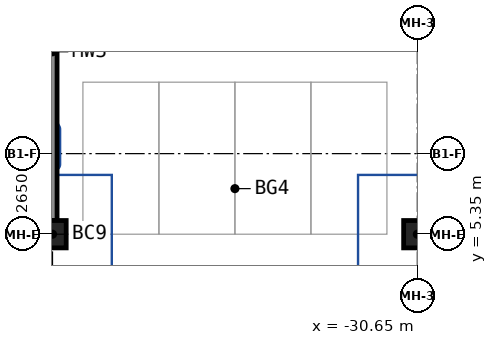
"""IFC4 building model, lengths in metres.
Left out: names, types, materials, properties, quantities, classifications, styles, units other than length and angle.
Written with IfcOpenShell. Run it as: python <this file> out.ifc"""

import sys

from ifc_helpers import new_model, si_unit, direction, frame, frame_2d, origin, origin_2d, place, context, subcontext, project, spatial, rectangle, extrude, source, transform, mapped, element, save


model = new_model("IFC4")
c1 = context("Model", 3, precision=1e-05, world=origin(), true_north=direction((0.0, 1.0)))
c2 = subcontext(c1, "Body", "Model", "MODEL_VIEW")
j1 = project(units=[si_unit("LENGTHUNIT", "METRE"), si_unit("PLANEANGLEUNIT", "RADIAN")], contexts=[c1])
p1 = place(None, origin())
s1 = spatial("IfcSite", under=j1, at=p1, CompositionType="ELEMENT")
p2 = place(p1, origin())
s2 = spatial("IfcBuilding", under=s1, at=p2, CompositionType="ELEMENT")
p3 = place(p2, frame((0.0, 0.0, -9.0)))
s3 = spatial("IfcBuildingStorey", under=s2, at=p3, CompositionType="ELEMENT", Elevation=-9.0)
m1 = source(origin(), c2, "Body", "SweptSolid", [
    extrude(rectangle(XDim=11.1, YDim=0.3, at=frame_2d((5.55, 0.0))), origin(), (0.0, 0.0, 1.0), 4.1),
])
p4 = place(p3, frame((-42.65, 5.8, 0.0), z_axis=(0.0, 0.0, 1.0), x_axis=(0.0, 1.0, 0.0)))
e1 = element("IfcWall", 1, at=p4, inside=s3, PredefinedType="SHEAR", context=c2, shape_type="MappedRepresentation", body=[
    mapped(m1, transform((0.0, 0.0, 0.0))),
])
m2 = source(origin(), c2, "Body", "SweptSolid", [
    extrude(rectangle(XDim=0.9, YDim=0.9, at=origin_2d()), origin(), (0.0, 0.0, 1.0), 4.5),
])
for number, where, z_axis, x_axis in (
    (2, (-42.65, 5.35, 0.0), (0.0, 0.0, 1.0), (1.0, 0.0, 0.0)),
    (3, (-30.65, 5.35, 0.0), (0.0, 0.0, 1.0), (1.0, 0.0, 0.0)),
):
    element("IfcColumn", number, at=place(p3, frame(where, z_axis=z_axis, x_axis=x_axis)), inside=s3, PredefinedType="COLUMN", context=c2, shape_type="MappedRepresentation", body=[
        mapped(m2, transform((0.0, 0.0, 0.0))),
    ])
save(model, sys.argv[1])
